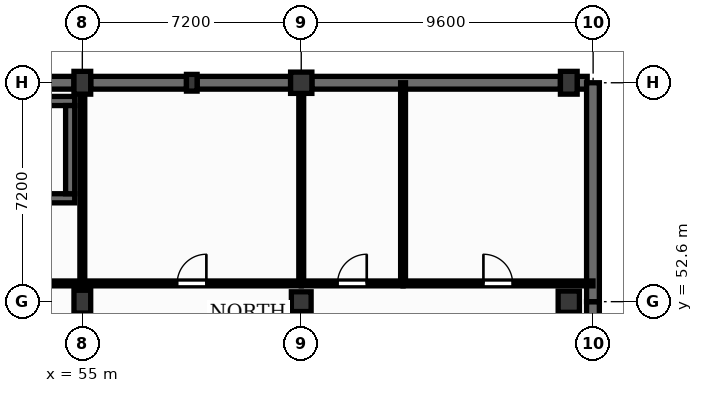
"""IFC4 building model, lengths in metres.
Left out: names, types, materials, properties, quantities, classifications, styles, units other than length and angle.
Written with IfcOpenShell. Run it as: python <this file> out.ifc"""

import sys

from ifc_helpers import new_model, si_unit, direction, frame, frame_2d, origin, origin_2d, place, context, subcontext, project, spatial, rectangle, extrude, element, fill, save


model = new_model("IFC4")
c1 = context("Model", 3, precision=1e-05, world=origin(), true_north=direction((0.0, 1.0)))
c2 = subcontext(c1, "Body", "Model", "MODEL_VIEW")
j1 = project(units=[si_unit("LENGTHUNIT", "METRE"), si_unit("PLANEANGLEUNIT", "RADIAN")], contexts=[c1])
p1 = place(None, origin())
s1 = spatial("IfcSite", under=j1, at=p1, CompositionType="ELEMENT")
p2 = place(p1, origin())
s2 = spatial("IfcBuilding", under=s1, at=p2, CompositionType="ELEMENT")
p3 = place(p2, frame((0.0, 0.0, -4.5)))
s3 = spatial("IfcBuildingStorey", under=s2, at=p3, CompositionType="ELEMENT", Elevation=-4.5)
for number, where, z_axis, x_axis in (
    (1, (55.0, 52.6, 0.0), (0.0, 0.0, 1.0), (1.0, 0.0, 0.0)),
    (2, (55.0, 59.8, 0.0), (0.0, 0.0, 1.0), (1.0, 0.0, 0.0)),
):
    element("IfcColumn", number, at=place(p3, frame(where, z_axis=z_axis, x_axis=x_axis)), inside=s3, PredefinedType="COLUMN", context=c2, shape_type="SweptSolid", body=[
        extrude(rectangle(XDim=0.55, YDim=0.75, at=origin_2d()), origin(), (0.0, 0.0, 1.0), 4.2),
    ])
p4 = place(p3, frame((62.2, 52.6, 0.0), z_axis=(0.0, 0.0, 1.0), x_axis=(1.0, 0.0, 0.0)))
e3 = element("IfcColumn", 3, at=p4, inside=s3, PredefinedType="COLUMN", context=c2, shape_type="SweptSolid", body=[
    extrude(rectangle(XDim=0.65, YDim=0.65, at=origin_2d()), origin(), (0.0, 0.0, 1.0), 4.2),
])
for number, where, z_axis, x_axis in (
    (4, (62.2, 59.8, 0.0), (0.0, 0.0, 1.0), (1.0, 0.0, 0.0)),
    (5, (71.0, 52.6, 0.0), (0.0, 0.0, 1.0), (1.0, 0.0, 0.0)),
):
    element("IfcColumn", number, at=place(p3, frame(where, z_axis=z_axis, x_axis=x_axis)), inside=s3, PredefinedType="COLUMN", context=c2, shape_type="SweptSolid", body=[
        extrude(rectangle(XDim=0.7, YDim=0.7, at=origin_2d()), origin(), (0.0, 0.0, 1.0), 4.2),
    ])
p5 = place(p3, frame((71.0, 59.8, 0.0), z_axis=(0.0, 0.0, 1.0), x_axis=(1.0, 0.0, 0.0)))
e6 = element("IfcColumn", 6, at=p5, inside=s3, PredefinedType="COLUMN", context=c2, shape_type="SweptSolid", body=[
    extrude(rectangle(XDim=0.55, YDim=0.75, at=origin_2d()), origin(), (0.0, 0.0, 1.0), 4.2),
])
p6 = place(p3, frame((58.6, 59.8, 0.0), z_axis=(0.0, 0.0, 1.0), x_axis=(1.0, 0.0, 0.0)))
e7 = element("IfcColumn", 7, at=p6, inside=s3, PredefinedType="PILASTER", context=c2, shape_type="SweptSolid", body=[
    extrude(rectangle(XDim=0.35, YDim=0.55, at=origin_2d()), origin(), (0.0, 0.0, 1.0), 4.2),
])
p7 = place(p3, frame((51.6, 59.8, 0.0), z_axis=(0.0, 0.0, 1.0), x_axis=(1.0, 0.0, 0.0)))
e8 = element("IfcWall", 8, at=p7, inside=s3, PredefinedType="USERDEFINED", context=c2, shape_type="SweptSolid", body=[
    extrude(rectangle(XDim=3.125, YDim=0.42, at=frame_2d((1.562, 0.0))), origin(), (0.0, 0.0, 1.0), 4.2),
])
p8 = place(p3, frame((55.275, 59.8, 0.0), z_axis=(0.0, 0.0, 1.0), x_axis=(1.0, 0.0, 0.0)))
e9 = element("IfcWall", 9, at=p8, inside=s3, PredefinedType="USERDEFINED", context=c2, shape_type="SweptSolid", body=[
    extrude(rectangle(XDim=3.15, YDim=0.42, at=frame_2d((1.575, 0.0))), origin(), (0.0, 0.0, 1.0), 4.2),
])
p9 = place(p3, frame((58.775, 59.8, 0.0), z_axis=(0.0, 0.0, 1.0), x_axis=(1.0, 0.0, 0.0)))
e10 = element("IfcWall", 10, at=p9, inside=s3, PredefinedType="USERDEFINED", context=c2, shape_type="SweptSolid", body=[
    extrude(rectangle(XDim=3.075, YDim=0.42, at=frame_2d((1.538, 0.0))), origin(), (0.0, 0.0, 1.0), 4.2),
])
p10 = place(p3, frame((71.795, 45.4, 0.0), z_axis=(0.0, 0.0, 1.0), x_axis=(0.0, 1.0, 0.0)))
e11 = element("IfcWall", 11, at=p10, inside=s3, PredefinedType="USERDEFINED", context=c2, shape_type="SweptSolid", body=[
    extrude(rectangle(XDim=7.2, YDim=0.42, at=frame_2d((3.6, 0.0))), origin(), (0.0, 0.0, 1.0), 4.2),
])
p11 = place(p3, frame((62.55, 59.8, 0.0), z_axis=(0.0, 0.0, 1.0), x_axis=(1.0, 0.0, 0.0)))
e12 = element("IfcWall", 12, at=p11, inside=s3, PredefinedType="USERDEFINED", context=c2, shape_type="SweptSolid", body=[
    extrude(rectangle(XDim=8.175, YDim=0.42, at=frame_2d((4.087, 0.0))), origin(), (0.0, 0.0, 1.0), 4.2),
])
p12 = place(p3, frame((71.275, 59.8, 0.0), z_axis=(0.0, 0.0, 1.0), x_axis=(1.0, 0.0, 0.0)))
e13 = element("IfcWall", 13, at=p12, inside=s3, PredefinedType="USERDEFINED", context=c2, shape_type="SweptSolid", body=[
    extrude(rectangle(XDim=0.33, YDim=0.42, at=frame_2d((0.165, 0.0))), origin(), (0.0, 0.0, 1.0), 4.2),
])
p13 = place(p3, frame((71.795, 52.6, 0.0), z_axis=(0.0, 0.0, 1.0), x_axis=(0.0, 1.0, 0.0)))
e14 = element("IfcWall", 14, at=p13, inside=s3, PredefinedType="USERDEFINED", context=c2, shape_type="SweptSolid", body=[
    extrude(rectangle(XDim=7.2, YDim=0.42, at=frame_2d((3.6, 0.0))), origin(), (0.0, 0.0, 1.0), 4.2),
])
for number, where, z_axis, x_axis in (
    (15, (48.05, 56.0, 0.0), (0.0, 0.0, 1.0), (1.0, 0.0, 0.0)),
    (16, (48.05, 59.2, 0.0), (0.0, 0.0, 1.0), (1.0, 0.0, 0.0)),
):
    element("IfcWall", number, at=place(p3, frame(where, z_axis=z_axis, x_axis=x_axis)), inside=s3, PredefinedType="SHEAR", context=c2, shape_type="SweptSolid", body=[
        extrude(rectangle(XDim=6.7, YDim=0.3, at=frame_2d((3.35, 0.0))), origin(), (0.0, 0.0, 1.0), 4.25),
    ])
p14 = place(p3, frame((54.6, 56.15, 0.0), z_axis=(0.0, 0.0, 1.0), x_axis=(0.0, 1.0, 0.0)))
e17 = element("IfcWall", 17, at=p14, inside=s3, PredefinedType="SHEAR", context=c2, shape_type="SweptSolid", body=[
    extrude(rectangle(XDim=2.9, YDim=0.3, at=frame_2d((1.45, 0.0))), origin(), (0.0, 0.0, 1.0), 4.25),
])
p15 = place(p3, frame((55.0, 53.2, 0.0), z_axis=(0.0, 0.0, 1.0), x_axis=(1.0, 0.0, 0.0)))
e18 = element("IfcWall", 18, at=p15, inside=s3, PredefinedType="PARTITIONING", context=c2, shape_type="SweptSolid", body=[
    extrude(rectangle(XDim=7.2, YDim=0.16, at=frame_2d((3.6, 0.0))), origin(), (0.0, 0.0, 1.0), 4.08),
])
p16 = place(p15, frame((3.12, 0.0, 0.0)))
e19 = element("IfcOpeningElement", 19, at=p16, cuts=e18, PredefinedType="OPENING", context=c2, shape_type="SweptSolid", body=[
    extrude(rectangle(XDim=0.96, YDim=2.1, at=frame_2d((0.48, 1.05))), frame((0.0, 0.09, 0.0), z_axis=(0.0, -1.0, 0.0), x_axis=(1.0, 0.0, 0.0)), (0.0, 0.0, 1.0), 0.18),
])
p17 = place(p3, frame((62.2, 53.27, 0.0), z_axis=(0.0, 0.0, 1.0), x_axis=(0.0, 1.0, 0.0)))
e20 = element("IfcWall", 20, at=p17, inside=s3, PredefinedType="PARTITIONING", context=c2, shape_type="SweptSolid", body=[
    extrude(rectangle(XDim=6.18, YDim=0.16, at=frame_2d((3.09, 0.0))), origin(), (0.0, 0.0, 1.0), 3.5),
])
p18 = place(p3, frame((62.2, 53.2, 0.0), z_axis=(0.0, 0.0, 1.0), x_axis=(1.0, 0.0, 0.0)))
e21 = element("IfcWall", 21, at=p18, inside=s3, PredefinedType="PARTITIONING", context=c2, shape_type="SweptSolid", body=[
    extrude(rectangle(XDim=3.349, YDim=0.16, at=frame_2d((1.675, 0.0))), origin(), (0.0, 0.0, 1.0), 4.08),
])
p19 = place(p18, frame((1.195, 0.0, 0.0)))
e22 = element("IfcOpeningElement", 22, at=p19, cuts=e21, PredefinedType="OPENING", context=c2, shape_type="SweptSolid", body=[
    extrude(rectangle(XDim=0.96, YDim=2.1, at=frame_2d((0.48, 1.05))), frame((0.0, 0.09, 0.0), z_axis=(0.0, -1.0, 0.0), x_axis=(1.0, 0.0, 0.0)), (0.0, 0.0, 1.0), 0.18),
])
p20 = place(p3, frame((65.549, 53.27, 0.0), z_axis=(0.0, 0.0, 1.0), x_axis=(0.0, 1.0, 0.0)))
e23 = element("IfcWall", 23, at=p20, inside=s3, PredefinedType="PARTITIONING", context=c2, shape_type="SweptSolid", body=[
    extrude(rectangle(XDim=6.53, YDim=0.16, at=frame_2d((3.265, 0.0))), origin(), (0.0, 0.0, 1.0), 4.08),
])
p21 = place(p3, frame((65.549, 53.2, 0.0), z_axis=(0.0, 0.0, 1.0), x_axis=(1.0, 0.0, 0.0)))
e24 = element("IfcWall", 24, at=p21, inside=s3, PredefinedType="PARTITIONING", context=c2, shape_type="SweptSolid", body=[
    extrude(rectangle(XDim=6.246, YDim=0.16, at=frame_2d((3.123, 0.0))), origin(), (0.0, 0.0, 1.0), 4.08),
])
p22 = place(p21, frame((2.643, 0.0, 0.0)))
e25 = element("IfcOpeningElement", 25, at=p22, cuts=e24, PredefinedType="OPENING", context=c2, shape_type="SweptSolid", body=[
    extrude(rectangle(XDim=0.96, YDim=2.1, at=frame_2d((0.48, 1.05))), frame((0.0, 0.09, 0.0), z_axis=(0.0, -1.0, 0.0), x_axis=(1.0, 0.0, 0.0)), (0.0, 0.0, 1.0), 0.18),
])
p23 = place(p3, frame((55.0, 53.2, 0.0), z_axis=(0.0, 0.0, 1.0), x_axis=(-1.0, 0.0, 0.0)))
e26 = element("IfcWall", 26, at=p23, inside=s3, PredefinedType="PARTITIONING", context=c2, shape_type="SweptSolid", body=[
    extrude(rectangle(XDim=2.8, YDim=0.16, at=frame_2d((1.4, 0.0))), origin(), (0.0, 0.0, 1.0), 4.08),
])
p24 = place(p3, frame((55.0, 53.27, 0.0), z_axis=(0.0, 0.0, 1.0), x_axis=(0.0, 1.0, 0.0)))
e27 = element("IfcWall", 27, at=p24, inside=s3, PredefinedType="PARTITIONING", context=c2, shape_type="SweptSolid", body=[
    extrude(rectangle(XDim=6.155, YDim=0.16, at=frame_2d((3.078, 0.0))), origin(), (0.0, 0.0, 1.0), 3.5),
])
p25 = place(p16, origin())
e28 = element("IfcDoor", 28, at=p25, inside=s3, OperationType="SINGLE_SWING_RIGHT", PredefinedType="DOOR", context=c2, shape_type="SweptSolid", body=[
    extrude(rectangle(XDim=0.96, YDim=2.1, at=frame_2d((0.48, 1.05))), frame((0.0, 0.025, 0.0), z_axis=(0.0, -1.0, 0.0), x_axis=(1.0, 0.0, 0.0)), (0.0, 0.0, 1.0), 0.05),
])
fill(e19, e28)
p26 = place(p19, origin())
e29 = element("IfcDoor", 29, at=p26, inside=s3, OperationType="SINGLE_SWING_RIGHT", PredefinedType="DOOR", context=c2, shape_type="SweptSolid", body=[
    extrude(rectangle(XDim=0.96, YDim=2.1, at=frame_2d((0.48, 1.05))), frame((0.0, 0.025, 0.0), z_axis=(0.0, -1.0, 0.0), x_axis=(1.0, 0.0, 0.0)), (0.0, 0.0, 1.0), 0.05),
])
fill(e22, e29)
p27 = place(p22, origin())
e30 = element("IfcDoor", 30, at=p27, inside=s3, OperationType="SINGLE_SWING_LEFT", PredefinedType="DOOR", context=c2, shape_type="SweptSolid", body=[
    extrude(rectangle(XDim=0.96, YDim=2.1, at=frame_2d((0.48, 1.05))), frame((0.0, 0.025, 0.0), z_axis=(0.0, -1.0, 0.0), x_axis=(1.0, 0.0, 0.0)), (0.0, 0.0, 1.0), 0.05),
])
fill(e25, e30)
save(model, sys.argv[1])
